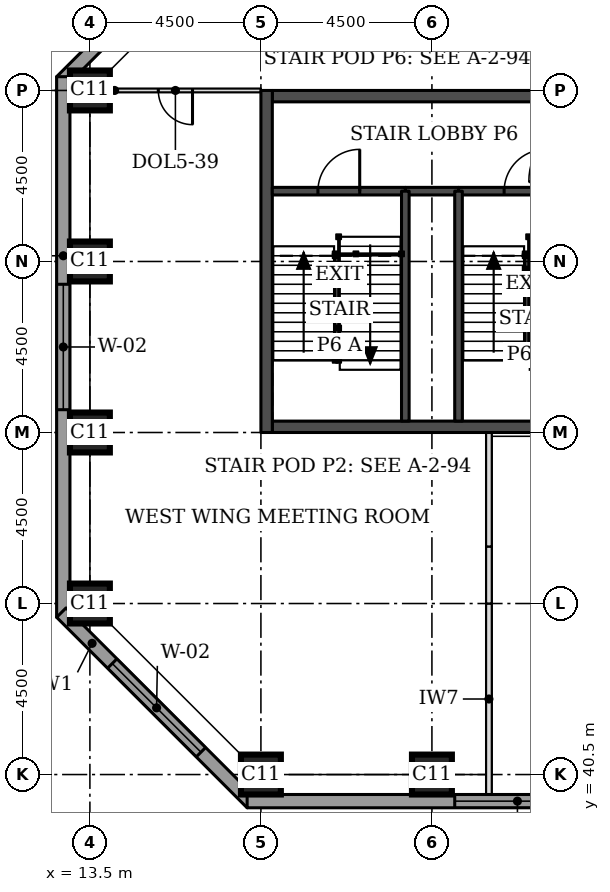
"""IFC4 building model, lengths in metres.
Left out: names, types, materials, properties, quantities, classifications, styles, units other than length and angle.
Written with IfcOpenShell. Run it as: python <this file> out.ifc"""

import sys

from ifc_helpers import new_model, si_unit, direction, frame, frame_2d, origin, origin_2d, place, context, subcontext, project, spatial, rectangle, extrude, element, fill, save


model = new_model("IFC4")
c1 = context("Model", 3, precision=1e-05, world=origin(), true_north=direction((0.0, 1.0)))
c2 = subcontext(c1, "Body", "Model", "MODEL_VIEW")
j1 = project(units=[si_unit("LENGTHUNIT", "METRE"), si_unit("PLANEANGLEUNIT", "RADIAN")], contexts=[c1])
p1 = place(None, origin())
s1 = spatial("IfcSite", under=j1, at=p1, CompositionType="ELEMENT")
p2 = place(p1, origin())
s2 = spatial("IfcBuilding", under=s1, at=p2, CompositionType="ELEMENT")
p3 = place(p2, frame((0.0, 0.0, 108.5)))
s3 = spatial("IfcBuildingStorey", under=s2, at=p3, CompositionType="ELEMENT", Elevation=108.5)
for number, where, z_axis, x_axis in (
    (1, (18.0, 40.5, 0.0), (0.0, 0.0, 1.0), (1.0, 0.0, 0.0)),
    (2, (22.5, 40.5, 0.0), (0.0, 0.0, 1.0), (1.0, 0.0, 0.0)),
    (3, (13.5, 45.0, 0.0), (0.0, 0.0, 1.0), (1.0, 0.0, 0.0)),
    (4, (13.5, 49.5, 0.0), (0.0, 0.0, 1.0), (1.0, 0.0, 0.0)),
    (5, (13.5, 54.0, 0.0), (0.0, 0.0, 1.0), (1.0, 0.0, 0.0)),
    (6, (13.5, 58.5, 0.0), (0.0, 0.0, 1.0), (1.0, 0.0, 0.0)),
):
    element("IfcColumn", number, at=place(p3, frame(where, z_axis=z_axis, x_axis=x_axis)), inside=s3, PredefinedType="COLUMN", context=c2, shape_type="SweptSolid", body=[
        extrude(rectangle(XDim=1.05, YDim=1.05, at=origin_2d()), origin(), (0.0, 0.0, 1.0), 3.7),
    ])
for number, where, z_axis, x_axis in (
    (7, (18.3, 49.65, 0.0), (0.0, 0.0, 1.0), (1.0, 0.0, 0.0)),
    (8, (18.3, 58.35, 0.0), (0.0, 0.0, 1.0), (1.0, 0.0, 0.0)),
):
    element("IfcWall", number, at=place(p3, frame(where, z_axis=z_axis, x_axis=x_axis)), inside=s3, PredefinedType="SHEAR", context=c2, shape_type="SweptSolid", body=[
        extrude(rectangle(XDim=8.4, YDim=0.3, at=frame_2d((4.2, 0.0))), origin(), (0.0, 0.0, 1.0), 3.7),
    ])
p4 = place(p3, frame((18.15, 49.5, 0.0), z_axis=(0.0, 0.0, 1.0), x_axis=(0.0, 1.0, 0.0)))
e9 = element("IfcWall", 9, at=p4, inside=s3, PredefinedType="SHEAR", context=c2, shape_type="SweptSolid", body=[
    extrude(rectangle(XDim=9.0, YDim=0.3, at=frame_2d((4.5, 0.0))), origin(), (0.0, 0.0, 1.0), 3.7),
])
p5 = place(p3, frame((17.761, 63.751, 0.0), z_axis=(0.0, 0.0, 1.0), x_axis=(-0.707106781187, -0.707106781187, 0.0)))
e10 = element("IfcWall", 10, at=p5, inside=s3, PredefinedType="STANDARD", context=c2, shape_type="SweptSolid", body=[
    extrude(rectangle(XDim=7.089, YDim=0.35, at=frame_2d((3.544, 0.0))), origin(), (0.0, 0.0, 1.0), 3.525),
])
p6 = place(p5, frame((1.894, 0.0, 0.9)))
e11 = element("IfcOpeningElement", 11, at=p6, cuts=e10, PredefinedType="OPENING", context=c2, shape_type="SweptSolid", body=[
    extrude(rectangle(XDim=3.3, YDim=1.9, at=frame_2d((1.65, 0.95))), frame((0.0, 0.185, 0.0), z_axis=(0.0, -1.0, 0.0), x_axis=(1.0, 0.0, 0.0)), (0.0, 0.0, 1.0), 0.37),
])
p7 = place(p3, frame((12.8, 58.862, 0.0), z_axis=(0.0, 0.0, 1.0), x_axis=(0.0, -1.0, 0.0)))
e12 = element("IfcWall", 12, at=p7, inside=s3, PredefinedType="STANDARD", context=c2, shape_type="SweptSolid", body=[
    extrude(rectangle(XDim=14.225, YDim=0.35, at=frame_2d((7.112, 0.0))), origin(), (0.0, 0.0, 1.0), 3.525),
])
p8 = place(p7, frame((5.462, 0.0, 0.9)))
e13 = element("IfcOpeningElement", 13, at=p8, cuts=e12, PredefinedType="OPENING", context=c2, shape_type="SweptSolid", body=[
    extrude(rectangle(XDim=3.3, YDim=1.9, at=frame_2d((1.65, 0.95))), frame((0.0, 0.185, 0.0), z_axis=(0.0, -1.0, 0.0), x_axis=(1.0, 0.0, 0.0)), (0.0, 0.0, 1.0), 0.37),
])
p9 = place(p3, frame((12.749, 44.761, 0.0), z_axis=(0.0, 0.0, 1.0), x_axis=(0.707106781187, -0.707106781187, 0.0)))
e14 = element("IfcWall", 14, at=p9, inside=s3, PredefinedType="STANDARD", context=c2, shape_type="SweptSolid", body=[
    extrude(rectangle(XDim=7.089, YDim=0.35, at=frame_2d((3.544, 0.0))), origin(), (0.0, 0.0, 1.0), 3.525),
])
p10 = place(p9, frame((1.894, 0.0, 0.9)))
e15 = element("IfcOpeningElement", 15, at=p10, cuts=e14, PredefinedType="OPENING", context=c2, shape_type="SweptSolid", body=[
    extrude(rectangle(XDim=3.3, YDim=1.9, at=frame_2d((1.65, 0.95))), frame((0.0, 0.185, 0.0), z_axis=(0.0, -1.0, 0.0), x_axis=(1.0, 0.0, 0.0)), (0.0, 0.0, 1.0), 0.37),
])
p11 = place(p3, frame((17.638, 39.8, 0.0), z_axis=(0.0, 0.0, 1.0), x_axis=(1.0, 0.0, 0.0)))
e16 = element("IfcWall", 16, at=p11, inside=s3, PredefinedType="STANDARD", context=c2, shape_type="SweptSolid", body=[
    extrude(rectangle(XDim=17.837, YDim=0.35, at=frame_2d((8.919, 0.0))), origin(), (0.0, 0.0, 1.0), 3.525),
])
p12 = place(p11, frame((5.462, 0.0, 0.9)))
e17 = element("IfcOpeningElement", 17, at=p12, cuts=e16, PredefinedType="OPENING", context=c2, shape_type="SweptSolid", body=[
    extrude(rectangle(XDim=3.3, YDim=1.9, at=frame_2d((1.65, 0.95))), frame((0.0, 0.185, 0.0), z_axis=(0.0, -1.0, 0.0), x_axis=(1.0, 0.0, 0.0)), (0.0, 0.0, 1.0), 0.37),
])
p13 = place(p11, frame((14.037, 0.0, 0.9)))
e18 = element("IfcOpeningElement", 18, at=p13, cuts=e16, PredefinedType="OPENING", context=c2, shape_type="SweptSolid", body=[
    extrude(rectangle(XDim=3.3, YDim=1.9, at=frame_2d((1.65, 0.95))), frame((0.0, 0.185, 0.0), z_axis=(0.0, -1.0, 0.0), x_axis=(1.0, 0.0, 0.0)), (0.0, 0.0, 1.0), 0.37),
])
p14 = place(p3, frame((24.0, 39.975, 0.0), z_axis=(0.0, 0.0, 1.0), x_axis=(0.0, 1.0, 0.0)))
e19 = element("IfcWall", 19, at=p14, inside=s3, PredefinedType="PARTITIONING", context=c2, shape_type="SweptSolid", body=[
    extrude(rectangle(XDim=5.025, YDim=0.15, at=frame_2d((2.512, 0.0))), origin(), (0.0, 0.0, 1.0), 3.55),
])
p15 = place(p3, frame((24.0, 45.0, 0.0), z_axis=(0.0, 0.0, 1.0), x_axis=(0.0, 1.0, 0.0)))
e20 = element("IfcWall", 20, at=p15, inside=s3, PredefinedType="PARTITIONING", context=c2, shape_type="SweptSolid", body=[
    extrude(rectangle(XDim=1.5, YDim=0.15, at=frame_2d((0.75, 0.0))), origin(), (0.0, 0.0, 1.0), 3.55),
])
p16 = place(p3, frame((24.0, 46.5, 0.0), z_axis=(0.0, 0.0, 1.0), x_axis=(0.0, 1.0, 0.0)))
e21 = element("IfcWall", 21, at=p16, inside=s3, PredefinedType="PARTITIONING", context=c2, shape_type="SweptSolid", body=[
    extrude(rectangle(XDim=3.0, YDim=0.15, at=frame_2d((1.5, 0.0))), origin(), (0.0, 0.0, 1.0), 3.55),
])
p17 = place(p3, frame((13.5, 58.5, 0.0), z_axis=(0.0, 0.0, 1.0), x_axis=(1.0, 0.0, 0.0)))
e22 = element("IfcWall", 22, at=p17, inside=s3, PredefinedType="PARTITIONING", context=c2, shape_type="SweptSolid", body=[
    extrude(rectangle(XDim=4.5, YDim=0.1, at=frame_2d((2.25, 0.0))), origin(), (0.0, 0.0, 1.0), 2.55),
])
p18 = place(p17, frame((1.8, 0.0, 0.0)))
e23 = element("IfcOpeningElement", 23, at=p18, cuts=e22, PredefinedType="OPENING", context=c2, shape_type="SweptSolid", body=[
    extrude(rectangle(XDim=0.9, YDim=2.1, at=frame_2d((0.45, 1.05))), frame((0.0, 0.06, 0.0), z_axis=(0.0, -1.0, 0.0), x_axis=(1.0, 0.0, 0.0)), (0.0, 0.0, 1.0), 0.12),
])
p19 = place(p3, frame((21.8, 55.85, 0.0), z_axis=(0.0, 0.0, 1.0), x_axis=(1.0, 0.0, 0.0)))
e24 = element("IfcWall", 24, at=p19, inside=s3, PredefinedType="SOLIDWALL", context=c2, shape_type="SweptSolid", body=[
    extrude(rectangle(XDim=1.4, YDim=0.2, at=frame_2d((0.7, 0.0))), origin(), (0.0, 0.0, 1.0), 3.55),
])
p20 = place(p3, frame((18.3, 55.85, 0.0), z_axis=(0.0, 0.0, 1.0), x_axis=(1.0, 0.0, 0.0)))
e25 = element("IfcWall", 25, at=p20, inside=s3, PredefinedType="SOLIDWALL", context=c2, shape_type="SweptSolid", body=[
    extrude(rectangle(XDim=3.5, YDim=0.2, at=frame_2d((1.75, 0.0))), origin(), (0.0, 0.0, 1.0), 3.55),
])
p21 = place(p20, frame((1.2, 0.0, 0.0)))
e26 = element("IfcOpeningElement", 26, at=p21, cuts=e25, PredefinedType="OPENING", context=c2, shape_type="SweptSolid", body=[
    extrude(rectangle(XDim=1.1, YDim=2.1, at=frame_2d((0.55, 1.05))), frame((0.0, 0.11, 0.0), z_axis=(0.0, -1.0, 0.0), x_axis=(1.0, 0.0, 0.0)), (0.0, 0.0, 1.0), 0.22),
])
p22 = place(p3, frame((23.2, 55.85, 0.0), z_axis=(0.0, 0.0, 1.0), x_axis=(1.0, 0.0, 0.0)))
e27 = element("IfcWall", 27, at=p22, inside=s3, PredefinedType="SOLIDWALL", context=c2, shape_type="SweptSolid", body=[
    extrude(rectangle(XDim=3.5, YDim=0.2, at=frame_2d((1.75, 0.0))), origin(), (0.0, 0.0, 1.0), 3.55),
])
p23 = place(p22, frame((1.2, 0.0, 0.0)))
e28 = element("IfcOpeningElement", 28, at=p23, cuts=e27, PredefinedType="OPENING", context=c2, shape_type="SweptSolid", body=[
    extrude(rectangle(XDim=1.1, YDim=2.1, at=frame_2d((0.55, 1.05))), frame((0.0, 0.11, 0.0), z_axis=(0.0, -1.0, 0.0), x_axis=(1.0, 0.0, 0.0)), (0.0, 0.0, 1.0), 0.22),
])
for number, where, z_axis, x_axis in (
    (29, (21.8, 49.8, 0.0), (0.0, 0.0, 1.0), (0.0, 1.0, 0.0)),
    (30, (23.2, 49.8, 0.0), (0.0, 0.0, 1.0), (0.0, 1.0, 0.0)),
):
    element("IfcWall", number, at=place(p3, frame(where, z_axis=z_axis, x_axis=x_axis)), inside=s3, PredefinedType="SOLIDWALL", context=c2, shape_type="SweptSolid", body=[
        extrude(rectangle(XDim=6.05, YDim=0.2, at=frame_2d((3.025, 0.0))), origin(), (0.0, 0.0, 1.0), 3.55),
    ])
p24 = place(p8, origin())
e31 = element("IfcWindow", 31, at=p24, inside=s3, PartitioningType="SINGLE_PANEL", PredefinedType="WINDOW", context=c2, shape_type="SweptSolid", body=[
    extrude(rectangle(XDim=3.3, YDim=1.9, at=frame_2d((1.65, 0.95))), frame((0.0, 0.085, 0.0), z_axis=(0.0, -1.0, 0.0), x_axis=(1.0, 0.0, 0.0)), (0.0, 0.0, 1.0), 0.06),
])
fill(e13, e31)
p25 = place(p10, origin())
e32 = element("IfcWindow", 32, at=p25, inside=s3, PartitioningType="SINGLE_PANEL", PredefinedType="WINDOW", context=c2, shape_type="SweptSolid", body=[
    extrude(rectangle(XDim=3.3, YDim=1.9, at=frame_2d((1.65, 0.95))), frame((0.0, 0.085, 0.0), z_axis=(0.0, -1.0, 0.0), x_axis=(1.0, 0.0, 0.0)), (0.0, 0.0, 1.0), 0.06),
])
fill(e15, e32)
p26 = place(p12, origin())
e33 = element("IfcWindow", 33, at=p26, inside=s3, PartitioningType="SINGLE_PANEL", PredefinedType="WINDOW", context=c2, shape_type="SweptSolid", body=[
    extrude(rectangle(XDim=3.3, YDim=1.9, at=frame_2d((1.65, 0.95))), frame((0.0, 0.085, 0.0), z_axis=(0.0, -1.0, 0.0), x_axis=(1.0, 0.0, 0.0)), (0.0, 0.0, 1.0), 0.06),
])
fill(e17, e33)
p27 = place(p18, frame((0.9, 0.0, 0.0), z_axis=(0.0, 0.0, 1.0), x_axis=(-1.0, 0.0, 0.0)))
e34 = element("IfcDoor", 34, at=p27, inside=s3, OperationType="SINGLE_SWING_LEFT", PredefinedType="DOOR", context=c2, shape_type="SweptSolid", body=[
    extrude(rectangle(XDim=0.9, YDim=2.1, at=frame_2d((0.45, 1.05))), frame((0.0, 0.025, 0.0), z_axis=(0.0, -1.0, 0.0), x_axis=(1.0, 0.0, 0.0)), (0.0, 0.0, 1.0), 0.05),
])
fill(e23, e34)
p28 = place(p21, origin())
e35 = element("IfcDoor", 35, at=p28, inside=s3, OperationType="SINGLE_SWING_RIGHT", PredefinedType="DOOR", context=c2, shape_type="SweptSolid", body=[
    extrude(rectangle(XDim=1.1, YDim=2.1, at=frame_2d((0.55, 1.05))), frame((0.0, 0.025, 0.0), z_axis=(0.0, -1.0, 0.0), x_axis=(1.0, 0.0, 0.0)), (0.0, 0.0, 1.0), 0.05),
])
fill(e26, e35)
p29 = place(p23, origin())
e36 = element("IfcDoor", 36, at=p29, inside=s3, OperationType="SINGLE_SWING_RIGHT", PredefinedType="DOOR", context=c2, shape_type="SweptSolid", body=[
    extrude(rectangle(XDim=1.1, YDim=2.1, at=frame_2d((0.55, 1.05))), frame((0.0, 0.025, 0.0), z_axis=(0.0, -1.0, 0.0), x_axis=(1.0, 0.0, 0.0)), (0.0, 0.0, 1.0), 0.05),
])
fill(e28, e36)
save(model, sys.argv[1])
